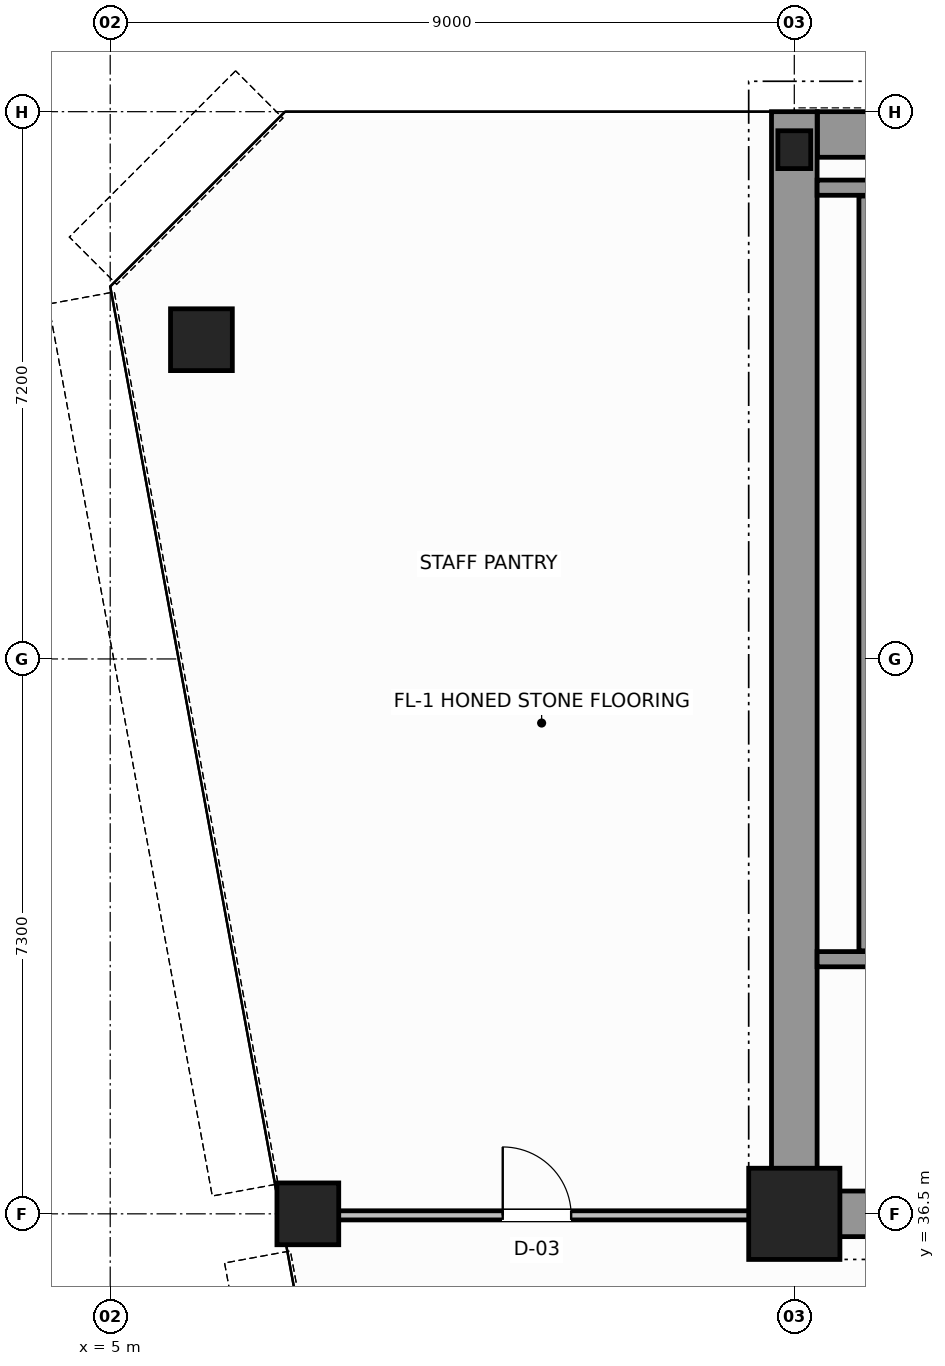
"""IFC4 building model, lengths in metres.
Left out: names, types, materials, properties, quantities, classifications, styles, units other than length and angle.
Written with IfcOpenShell. Run it as: python <this file> out.ifc"""

import sys

from ifc_helpers import new_model, si_unit, direction, frame, frame_2d, origin, origin_2d, place, context, subcontext, project, spatial, rectangle, hollow_circle, i_section, extrude, source, transform, mapped, element, fill, save


model = new_model("IFC4")
c1 = context("Model", 3, precision=1e-05, world=origin(), true_north=direction((0.0, 1.0)))
c2 = subcontext(c1, "Body", "Model", "MODEL_VIEW")
j1 = project(units=[si_unit("LENGTHUNIT", "METRE"), si_unit("PLANEANGLEUNIT", "RADIAN")], contexts=[c1])
p1 = place(None, origin())
s1 = spatial("IfcSite", under=j1, at=p1, CompositionType="ELEMENT")
p2 = place(p1, origin())
s2 = spatial("IfcBuilding", under=s1, at=p2, CompositionType="ELEMENT")
p3 = place(p2, frame((0.0, 0.0, 199.4)))
s3 = spatial("IfcBuildingStorey", under=s2, at=p3, CompositionType="ELEMENT", Elevation=199.4)
m1 = source(origin(), c2, "Body", "SweptSolid", [
    extrude(rectangle(XDim=1.2, YDim=1.2, at=origin_2d()), origin(), (0.0, 0.0, 1.0), 3.8),
])
p4 = place(p3, frame((14.0, 36.5, 0.0), z_axis=(0.0, 0.0, 1.0), x_axis=(1.0, 0.0, 0.0)))
e1 = element("IfcColumn", 1, at=p4, inside=s3, PredefinedType="COLUMN", context=c2, shape_type="MappedRepresentation", body=[
    mapped(m1, transform((0.0, 0.0, 0.0), scale=1.0)),
])
m2 = source(origin(), c2, "Body", "SweptSolid", [
    extrude(i_section(OverallWidth=0.432, OverallDepth=0.498, WebThickness=0.055, FlangeThickness=0.068, FilletRadius=0.015, at=origin_2d()), origin(), (0.0, 0.0, 1.0), 3.8),
])
p5 = place(p3, frame((14.0, 50.5, 0.0), z_axis=(0.0, 0.0, 1.0), x_axis=(1.0, 0.0, 0.0)))
e2 = element("IfcColumn", 2, at=p5, inside=s3, PredefinedType="COLUMN", context=c2, shape_type="MappedRepresentation", body=[
    mapped(m2, transform((0.0, 0.0, 0.0), scale=1.0)),
])
m3 = source(origin(), c2, "Body", "SweptSolid", [
    extrude(hollow_circle(Radius=0.406, WallThickness=0.04, at=origin_2d()), origin(), (0.0, 0.0, 1.0), 3.8),
])
for number, where, z_axis, x_axis in (
    (3, (6.2, 48.0, 0.0), (0.0, 0.0, 1.0), (1.0, 0.0, 0.0)),
    (4, (7.6, 36.5, 0.0), (0.0, 0.0, 1.0), (1.0, 0.0, 0.0)),
):
    element("IfcColumn", number, at=place(p3, frame(where, z_axis=z_axis, x_axis=x_axis)), inside=s3, PredefinedType="COLUMN", context=c2, shape_type="MappedRepresentation", body=[
        mapped(m3, transform((0.0, 0.0, 0.0), scale=1.0)),
    ])
p6 = place(p3, frame((14.304, 50.7, 0.0), z_axis=(0.0, 0.0, 1.0), x_axis=(1.0, 0.0, 0.0)))
e5 = element("IfcWall", 5, at=p6, inside=s3, PredefinedType="SHEAR", context=c2, shape_type="SweptSolid", body=[
    extrude(rectangle(XDim=19.694, YDim=0.6, at=frame_2d((9.847, 0.0))), origin(), (0.0, 0.0, 1.0), 3.8),
])
p7 = place(p3, frame((14.0, 36.5, 0.0), z_axis=(0.0, 0.0, 1.0), x_axis=(0.0, 1.0, 0.0)))
e6 = element("IfcWall", 6, at=p7, inside=s3, PredefinedType="SHEAR", context=c2, shape_type="SweptSolid", body=[
    extrude(rectangle(XDim=14.5, YDim=0.6, at=frame_2d((7.25, 0.0))), origin(), (0.0, 0.0, 1.0), 3.8),
])
p8 = place(p3, frame((14.32, 36.5, 0.0), z_axis=(0.0, 0.0, 1.0), x_axis=(1.0, 0.0, 0.0)))
e7 = element("IfcWall", 7, at=p8, inside=s3, PredefinedType="SHEAR", context=c2, shape_type="SweptSolid", body=[
    extrude(rectangle(XDim=3.88, YDim=0.6, at=frame_2d((1.94, 0.0))), origin(), (0.0, 0.0, 1.0), 2.58),
])
p9 = place(p3, frame((14.3, 39.85, 0.0), z_axis=(0.0, 0.0, 1.0), x_axis=(1.0, 0.0, 0.0)))
e8 = element("IfcWall", 8, at=p9, inside=s3, PredefinedType="SOLIDWALL", context=c2, shape_type="SweptSolid", body=[
    extrude(rectangle(XDim=4.3, YDim=0.2, at=frame_2d((2.15, 0.0))), origin(), (0.0, 0.0, 1.0), 3.8),
])
p10 = place(p9, frame((1.875, 0.0, 0.0)))
e9 = element("IfcOpeningElement", 9, at=p10, cuts=e8, PredefinedType="OPENING", context=c2, shape_type="SweptSolid", body=[
    extrude(rectangle(XDim=1.1, YDim=2.15, at=frame_2d((0.55, 1.075))), frame((0.0, 0.11, 0.0), z_axis=(0.0, -1.0, 0.0), x_axis=(1.0, 0.0, 0.0)), (0.0, 0.0, 1.0), 0.22),
])
p11 = place(p3, frame((14.3, 50.0, 0.0), z_axis=(0.0, 0.0, 1.0), x_axis=(1.0, 0.0, 0.0)))
e10 = element("IfcWall", 10, at=p11, inside=s3, PredefinedType="SOLIDWALL", context=c2, shape_type="SweptSolid", body=[
    extrude(rectangle(XDim=4.3, YDim=0.2, at=frame_2d((2.15, 0.0))), origin(), (0.0, 0.0, 1.0), 3.8),
])
p12 = place(p3, frame((14.95, 39.96, 0.0), z_axis=(0.0, 0.0, 1.0), x_axis=(0.0, 1.0, 0.0)))
e11 = element("IfcWall", 11, at=p12, inside=s3, PredefinedType="SOLIDWALL", context=c2, shape_type="SweptSolid", body=[
    extrude(rectangle(XDim=9.93, YDim=0.2, at=frame_2d((4.965, 0.0))), origin(), (0.0, 0.0, 1.0), 3.8),
])
p13 = place(p3, frame((7.289, 36.48, 0.0), z_axis=(0.0, 0.0, 1.0), x_axis=(1.0, 0.0, 0.0)))
e12 = element("IfcWall", 12, at=p13, inside=s3, PredefinedType="PARTITIONING", context=c2, shape_type="SweptSolid", body=[
    extrude(rectangle(XDim=6.651, YDim=0.12, at=frame_2d((3.325, 0.0))), origin(), (0.0, 0.0, 1.0), 2.97),
])
p14 = place(p13, frame((2.875, 0.0, 0.0)))
e13 = element("IfcOpeningElement", 13, at=p14, cuts=e12, PredefinedType="OPENING", context=c2, shape_type="SweptSolid", body=[
    extrude(rectangle(XDim=0.9, YDim=2.15, at=frame_2d((0.45, 1.075))), frame((0.0, 0.07, 0.0), z_axis=(0.0, -1.0, 0.0), x_axis=(1.0, 0.0, 0.0)), (0.0, 0.0, 1.0), 0.14),
])
m4 = source(origin(), c2, "Body", "SweptSolid", [
    extrude(rectangle(XDim=0.9, YDim=2.15, at=frame_2d((0.45, 1.075))), frame((0.0, 0.025, 0.0), z_axis=(0.0, -1.0, 0.0), x_axis=(1.0, 0.0, 0.0)), (0.0, 0.0, 1.0), 0.05),
])
p15 = place(p14, origin())
e14 = element("IfcDoor", 14, at=p15, inside=s3, OperationType="SINGLE_SWING_LEFT", PredefinedType="DOOR", context=c2, shape_type="MappedRepresentation", body=[
    mapped(m4, transform((0.0, 0.0, 0.0), scale=1.0)),
])
fill(e13, e14)
save(model, sys.argv[1])
